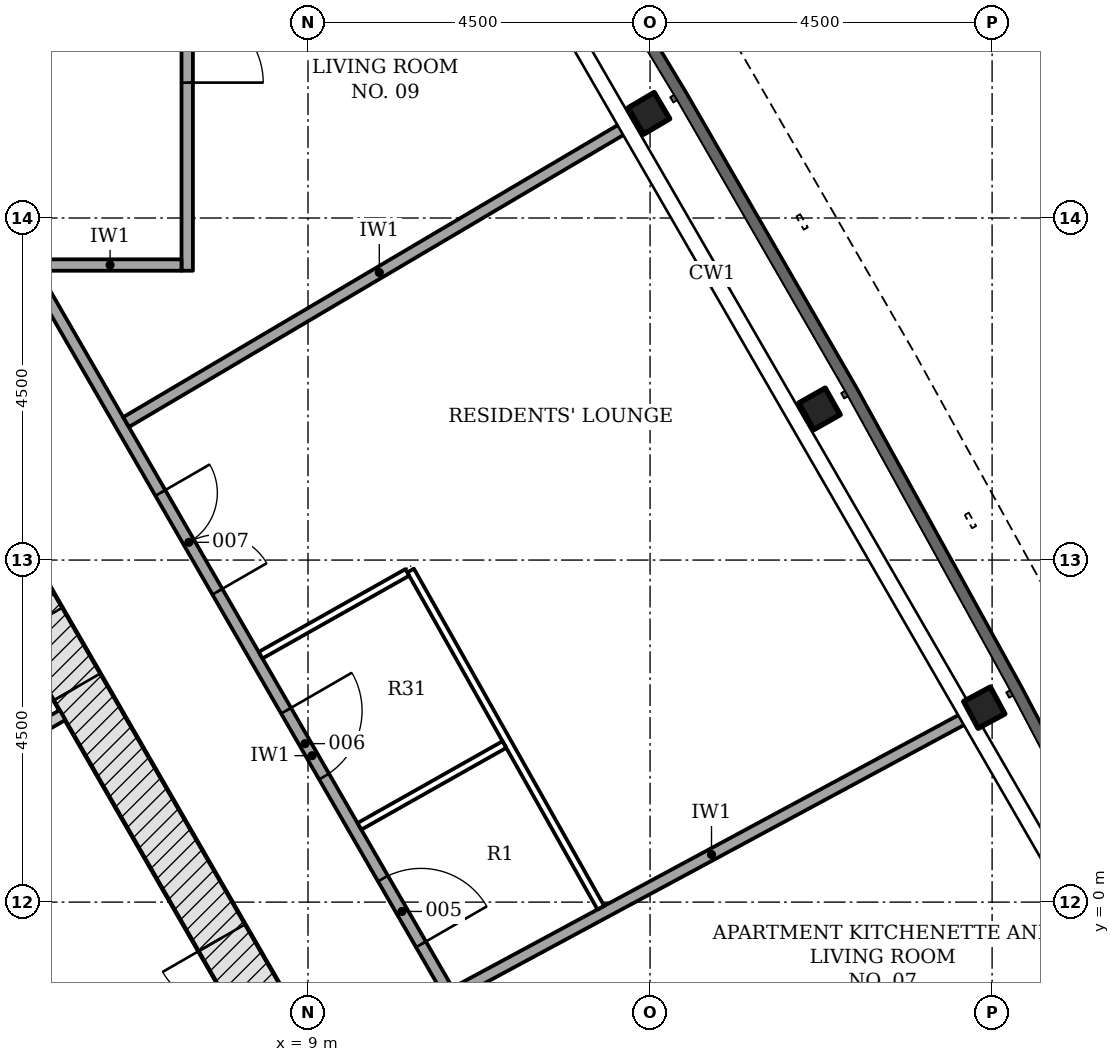
"""IFC4 building model, lengths in metres.
Left out: names, types, materials, properties, quantities, classifications, styles, units other than length and angle.
Written with IfcOpenShell. Run it as: python <this file> out.ifc"""

import sys

from ifc_helpers import new_model, si_unit, direction, frame, frame_2d, origin, origin_2d, place, context, subcontext, project, spatial, rectangle, i_section, extrude, element, fill, save


model = new_model("IFC4")
c1 = context("Model", 3, precision=1e-05, world=origin(), true_north=direction((0.0, 1.0)))
c2 = subcontext(c1, "Body", "Model", "MODEL_VIEW")
j1 = project(units=[si_unit("LENGTHUNIT", "METRE"), si_unit("PLANEANGLEUNIT", "RADIAN")], contexts=[c1])
p1 = place(None, origin())
s1 = spatial("IfcSite", under=j1, at=p1, CompositionType="ELEMENT")
p2 = place(p1, origin())
s2 = spatial("IfcBuilding", under=s1, at=p2, CompositionType="ELEMENT")
p3 = place(p2, frame((0.0, 0.0, 91.5)))
s3 = spatial("IfcBuildingStorey", under=s2, at=p3, CompositionType="ELEMENT", Elevation=91.5)
p4 = place(p3, frame((10.311, -4.703, -0.2), z_axis=(0.0, 0.0, 1.0), x_axis=(-0.500001446645, 0.866024568562, 0.0)))
e1 = element("IfcWall", 1, at=p4, inside=s3, PredefinedType="SHEAR", context=c2, shape_type="SweptSolid", body=[
    extrude(rectangle(XDim=18.458, YDim=0.7, at=frame_2d((9.229, 0.0))), origin(), (0.0, 0.0, 1.0), 3.6),
])
p5 = place(p4, frame((8.7, 0.0, 0.2)))
e2 = element("IfcOpeningElement", 2, at=p5, cuts=e1, PredefinedType="OPENING", context=c2, shape_type="SweptSolid", body=[
    extrude(rectangle(XDim=1.0, YDim=2.1, at=frame_2d((0.5, 1.05))), frame((0.0, 0.36, 0.0), z_axis=(0.0, -1.0, 0.0), x_axis=(1.0, 0.0, 0.0)), (0.0, 0.0, 1.0), 0.72),
])
p6 = place(p4, frame((3.99, 0.0, 0.2)))
e3 = element("IfcOpeningElement", 3, at=p6, cuts=e1, PredefinedType="OPENING", context=c2, shape_type="SweptSolid", body=[
    extrude(rectangle(XDim=0.9, YDim=2.1, at=frame_2d((0.45, 1.05))), frame((0.0, 0.36, 0.0), z_axis=(0.0, -1.0, 0.0), x_axis=(1.0, 0.0, 0.0)), (0.0, 0.0, 1.0), 0.72),
])
p7 = place(p4, frame((13.539, 0.0, 0.2)))
e4 = element("IfcOpeningElement", 4, at=p7, cuts=e1, PredefinedType="OPENING", context=c2, shape_type="SweptSolid", body=[
    extrude(rectangle(XDim=0.9, YDim=2.1, at=frame_2d((0.45, 1.05))), frame((0.0, 0.36, 0.0), z_axis=(0.0, -1.0, 0.0), x_axis=(1.0, 0.0, 0.0)), (0.0, 0.0, 1.0), 0.72),
])
for number, where, z_axis, x_axis in (
    (5, (17.897, 2.558, -0.2), (0.0, 0.0, 1.0), (-0.474, 0.88, 0.0)),
    (6, (15.729, 6.49, -0.2), (0.0, 0.0, 1.0), (-0.491, 0.871, 0.0)),
    (7, (13.484, 10.377, -0.2), (0.0, 0.0, 1.0), (-0.508, 0.861, 0.0)),
):
    element("IfcColumn", number, at=place(p3, frame(where, z_axis=z_axis, x_axis=x_axis)), inside=s3, PredefinedType="COLUMN", context=c2, shape_type="SweptSolid", body=[
        extrude(i_section(OverallWidth=0.401, OverallDepth=0.399, WebThickness=0.025, FlangeThickness=0.04, FilletRadius=0.015, at=origin_2d()), origin(), (0.0, 0.0, 1.0), 3.6),
    ])
p8 = place(p3, frame((-4.404, -3.413, 0.0), z_axis=(0.0, 0.0, 1.0), x_axis=(0.866022252853, 0.500005457533, 0.0)))
e8 = element("IfcWall", 8, at=p8, inside=s3, PredefinedType="PARTITIONING", context=c2, shape_type="SweptSolid", body=[
    extrude(rectangle(XDim=11.749, YDim=0.15, at=frame_2d((5.875, 0.0))), origin(), (0.0, 0.0, 1.0), 3.4),
])
p9 = place(p8, frame((3.875, 0.0, 0.0)))
e9 = element("IfcOpeningElement", 9, at=p9, cuts=e8, PredefinedType="OPENING", context=c2, shape_type="SweptSolid", body=[
    extrude(rectangle(XDim=0.9, YDim=2.1, at=frame_2d((0.45, 1.05))), frame((0.0, 0.085, 0.0), z_axis=(0.0, -1.0, 0.0), x_axis=(1.0, 0.0, 0.0)), (0.0, 0.0, 1.0), 0.17),
])
p10 = place(p3, frame((5.598, -3.439, 0.0), z_axis=(0.0, 0.0, 1.0), x_axis=(-0.500007155043, 0.866021272779, 0.0)))
e10 = element("IfcWall", 10, at=p10, inside=s3, PredefinedType="PARTITIONING", context=c2, shape_type="SweptSolid", body=[
    extrude(rectangle(XDim=4.949, YDim=0.15, at=frame_2d((2.474, 0.0))), origin(), (0.0, 0.0, 1.0), 3.4),
])
p11 = place(p3, frame((5.289, 8.446, 0.0), z_axis=(0.0, 0.0, 1.0), x_axis=(0.499996620721, -0.866027354803, 0.0)))
e11 = element("IfcWall", 11, at=p11, inside=s3, PredefinedType="PARTITIONING", context=c2, shape_type="SweptSolid", body=[
    extrude(rectangle(XDim=15.057, YDim=0.15, at=frame_2d((7.528, 0.0))), origin(), (0.0, 0.0, 1.0), 2.778),
])
p12 = place(p11, frame((12.566, 0.0, 0.0)))
e12 = element("IfcOpeningElement", 12, at=p12, cuts=e11, PredefinedType="OPENING", context=c2, shape_type="SweptSolid", body=[
    extrude(rectangle(XDim=1.0, YDim=2.1, at=frame_2d((0.5, 1.05))), frame((0.0, 0.085, 0.0), z_axis=(0.0, -1.0, 0.0), x_axis=(1.0, 0.0, 0.0)), (0.0, 0.0, 1.0), 0.17),
])
p13 = place(p11, frame((9.395, 0.0, 0.0)))
e13 = element("IfcOpeningElement", 13, at=p13, cuts=e11, PredefinedType="OPENING", context=c2, shape_type="SweptSolid", body=[
    extrude(rectangle(XDim=1.0, YDim=2.1, at=frame_2d((0.5, 1.05))), frame((0.0, 0.085, 0.0), z_axis=(0.0, -1.0, 0.0), x_axis=(1.0, 0.0, 0.0)), (0.0, 0.0, 1.0), 0.17),
])
p14 = place(p11, frame((6.845, 0.0, 0.0)))
e14 = element("IfcOpeningElement", 14, at=p14, cuts=e11, PredefinedType="OPENING", context=c2, shape_type="SweptSolid", body=[
    extrude(rectangle(XDim=1.0, YDim=2.1, at=frame_2d((0.5, 1.05))), frame((0.0, 0.085, 0.0), z_axis=(0.0, -1.0, 0.0), x_axis=(1.0, 0.0, 0.0)), (0.0, 0.0, 1.0), 0.17),
])
p15 = place(p11, frame((3.537, 0.0, 0.0)))
e15 = element("IfcOpeningElement", 15, at=p15, cuts=e11, PredefinedType="OPENING", context=c2, shape_type="SweptSolid", body=[
    extrude(rectangle(XDim=1.5, YDim=2.1, at=frame_2d((0.75, 1.05))), frame((0.0, 0.085, 0.0), z_axis=(0.0, -1.0, 0.0), x_axis=(1.0, 0.0, 0.0)), (0.0, 0.0, 1.0), 0.17),
])
p16 = place(p3, frame((7.411, 14.256, 0.0), z_axis=(0.0, 0.0, 1.0), x_axis=(0.0, -1.0, 0.0)))
e16 = element("IfcWall", 16, at=p16, inside=s3, PredefinedType="PARTITIONING", context=c2, shape_type="SweptSolid", body=[
    extrude(rectangle(XDim=5.95, YDim=0.15, at=frame_2d((2.975, 0.0))), origin(), (0.0, 0.0, 1.0), 2.778),
])
p17 = place(p16, frame((2.475, 0.0, 0.0)))
e17 = element("IfcOpeningElement", 17, at=p17, cuts=e16, PredefinedType="OPENING", context=c2, shape_type="SweptSolid", body=[
    extrude(rectangle(XDim=1.0, YDim=2.1, at=frame_2d((0.5, 1.05))), frame((0.0, 0.085, 0.0), z_axis=(0.0, -1.0, 0.0), x_axis=(1.0, 0.0, 0.0)), (0.0, 0.0, 1.0), 0.17),
])
p18 = place(p3, frame((5.456, 8.381, 0.0), z_axis=(0.0, 0.0, 1.0), x_axis=(1.0, 0.0, 0.0)))
e18 = element("IfcWall", 18, at=p18, inside=s3, PredefinedType="PARTITIONING", context=c2, shape_type="SweptSolid", body=[
    extrude(rectangle(XDim=1.88, YDim=0.15, at=frame_2d((0.94, 0.0))), origin(), (0.0, 0.0, 1.0), 3.4),
])
p19 = place(p3, frame((13.269, 10.25, 0.0), z_axis=(0.0, 0.0, 1.0), x_axis=(-0.861057776749, -0.508507133775, 0.0)))
e19 = element("IfcWall", 19, at=p19, inside=s3, PredefinedType="PARTITIONING", context=c2, shape_type="SweptSolid", body=[
    extrude(rectangle(XDim=7.738, YDim=0.15, at=frame_2d((3.869, 0.0))), origin(), (0.0, 0.0, 1.0), 2.778),
])
p20 = place(p3, frame((17.677, 2.44, 0.0), z_axis=(0.0, 0.0, 1.0), x_axis=(-0.880400392736, -0.47423111293, 0.0)))
e20 = element("IfcWall", 20, at=p20, inside=s3, PredefinedType="PARTITIONING", context=c2, shape_type="SweptSolid", body=[
    extrude(rectangle(XDim=7.651, YDim=0.15, at=frame_2d((3.826, 0.0))), origin(), (0.0, 0.0, 1.0), 2.778),
])
p21 = place(p3, frame((12.852, -0.073, 0.0), z_axis=(0.0, 0.0, 1.0), x_axis=(-0.491453614565, 0.870903751703, 0.0)))
e21 = element("IfcWall", 21, at=p21, inside=s3, PredefinedType="PARTITIONING", context=c2, shape_type="SweptSolid", body=[
    extrude(rectangle(XDim=5.092, YDim=0.1, at=frame_2d((2.546, 0.0))), origin(), (0.0, 0.0, 1.0), 2.778),
])
p22 = place(p3, frame((10.306, 4.337, 0.0), z_axis=(0.0, 0.0, 1.0), x_axis=(-0.870909527441, -0.491443379253, 0.0)))
e22 = element("IfcWall", 22, at=p22, inside=s3, PredefinedType="PARTITIONING", context=c2, shape_type="SweptSolid", body=[
    extrude(rectangle(XDim=2.215, YDim=0.1, at=frame_2d((1.107, 0.0))), origin(), (0.0, 0.0, 1.0), 3.4),
])
p23 = place(p3, frame((11.584, 2.073, 0.0), z_axis=(0.0, 0.0, 1.0), x_axis=(-0.870892816927, -0.491472991552, 0.0)))
e23 = element("IfcWall", 23, at=p23, inside=s3, PredefinedType="PARTITIONING", context=c2, shape_type="SweptSolid", body=[
    extrude(rectangle(XDim=2.19, YDim=0.1, at=frame_2d((1.095, 0.0))), origin(), (0.0, 0.0, 1.0), 3.4),
])
p24 = place(p5, origin())
e24 = element("IfcDoor", 24, at=p24, inside=s3, OperationType="SINGLE_SWING_LEFT", PredefinedType="DOOR", context=c2, shape_type="SweptSolid", body=[
    extrude(rectangle(XDim=1.0, YDim=2.1, at=frame_2d((0.5, 1.05))), frame((0.0, 0.075, 0.0), z_axis=(0.0, -1.0, 0.0), x_axis=(1.0, 0.0, 0.0)), (0.0, 0.0, 1.0), 0.15),
])
fill(e2, e24)
p25 = place(p6, origin())
e25 = element("IfcDoor", 25, at=p25, inside=s3, OperationType="SINGLE_SWING_RIGHT", PredefinedType="DOOR", context=c2, shape_type="SweptSolid", body=[
    extrude(rectangle(XDim=0.9, YDim=2.1, at=frame_2d((0.45, 1.05))), frame((0.0, 0.075, 0.0), z_axis=(0.0, -1.0, 0.0), x_axis=(1.0, 0.0, 0.0)), (0.0, 0.0, 1.0), 0.15),
])
fill(e3, e25)
p26 = place(p13, origin())
e26 = element("IfcDoor", 26, at=p26, inside=s3, OperationType="SINGLE_SWING_RIGHT", PredefinedType="DOOR", context=c2, shape_type="SweptSolid", body=[
    extrude(rectangle(XDim=1.0, YDim=2.1, at=frame_2d((0.5, 1.05))), frame((0.0, 0.025, 0.0), z_axis=(0.0, -1.0, 0.0), x_axis=(1.0, 0.0, 0.0)), (0.0, 0.0, 1.0), 0.05),
])
fill(e13, e26)
p27 = place(p14, origin())
e27 = element("IfcDoor", 27, at=p27, inside=s3, OperationType="SINGLE_SWING_LEFT", PredefinedType="DOOR", context=c2, shape_type="SweptSolid", body=[
    extrude(rectangle(XDim=1.0, YDim=2.1, at=frame_2d((0.5, 1.05))), frame((0.0, 0.025, 0.0), z_axis=(0.0, -1.0, 0.0), x_axis=(1.0, 0.0, 0.0)), (0.0, 0.0, 1.0), 0.05),
])
fill(e14, e27)
p28 = place(p15, origin())
e28 = element("IfcDoor", 28, at=p28, inside=s3, OperationType="DOUBLE_DOOR_SINGLE_SWING", PredefinedType="DOOR", context=c2, shape_type="SweptSolid", body=[
    extrude(rectangle(XDim=1.5, YDim=2.1, at=frame_2d((0.75, 1.05))), frame((0.0, 0.025, 0.0), z_axis=(0.0, -1.0, 0.0), x_axis=(1.0, 0.0, 0.0)), (0.0, 0.0, 1.0), 0.05),
])
fill(e15, e28)
p29 = place(p17, origin())
e29 = element("IfcDoor", 29, at=p29, inside=s3, OperationType="SINGLE_SWING_RIGHT", PredefinedType="DOOR", context=c2, shape_type="SweptSolid", body=[
    extrude(rectangle(XDim=1.0, YDim=2.1, at=frame_2d((0.5, 1.05))), frame((0.0, 0.025, 0.0), z_axis=(0.0, -1.0, 0.0), x_axis=(1.0, 0.0, 0.0)), (0.0, 0.0, 1.0), 0.05),
])
fill(e17, e29)
save(model, sys.argv[1])
